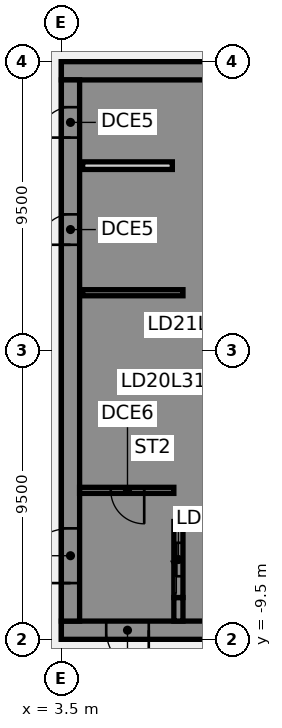
"""IFC4 building model, lengths in metres.
Left out: names, types, materials, properties, quantities, classifications, styles, units other than length and angle.
Written with IfcOpenShell. Run it as: python <this file> out.ifc"""

import sys

from ifc_helpers import new_model, si_unit, direction, frame, frame_2d, origin, place, context, subcontext, project, spatial, polyline, rectangle, outline, extrude, element, fill, save


model = new_model("IFC4")
c1 = context("Model", 3, precision=1e-05, world=origin(), true_north=direction((0.0, 1.0)))
c2 = subcontext(c1, "Body", "Model", "MODEL_VIEW")
j1 = project(units=[si_unit("LENGTHUNIT", "METRE"), si_unit("PLANEANGLEUNIT", "RADIAN")], contexts=[c1])
p1 = place(None, origin())
s1 = spatial("IfcSite", under=j1, at=p1, CompositionType="ELEMENT")
p2 = place(p1, origin())
s2 = spatial("IfcBuilding", under=s1, at=p2, CompositionType="ELEMENT")
p3 = place(p2, frame((0.0, 0.0, 128.5)))
s3 = spatial("IfcBuildingStorey", under=s2, at=p3, CompositionType="ELEMENT", Elevation=128.5)
p4 = place(p3, frame((16.5, -9.2, 0.0), z_axis=(0.0, 0.0, 1.0), x_axis=(-1.0, 0.0, 0.0)))
e1 = element("IfcWall", 1, at=p4, inside=s3, PredefinedType="SHEAR", context=c2, shape_type="SweptSolid", body=[
    extrude(rectangle(XDim=13.0, YDim=0.6, at=frame_2d((6.5, 0.0))), origin(), (0.0, 0.0, 1.0), 4.36),
])
p5 = place(p4, frame((4.15, 0.0, 0.0)))
e2 = element("IfcOpeningElement", 2, at=p5, cuts=e1, PredefinedType="OPENING", context=c2, shape_type="SweptSolid", body=[
    extrude(rectangle(XDim=1.4, YDim=2.1, at=frame_2d((0.7, 1.05))), frame((0.0, 0.31, 0.0), z_axis=(0.0, -1.0, 0.0), x_axis=(1.0, 0.0, 0.0)), (0.0, 0.0, 1.0), 0.62),
])
p6 = place(p4, frame((10.125, 0.0, 0.0)))
e3 = element("IfcOpeningElement", 3, at=p6, cuts=e1, PredefinedType="OPENING", context=c2, shape_type="SweptSolid", body=[
    extrude(rectangle(XDim=1.4, YDim=2.1, at=frame_2d((0.7, 1.05))), frame((0.0, 0.31, 0.0), z_axis=(0.0, -1.0, 0.0), x_axis=(1.0, 0.0, 0.0)), (0.0, 0.0, 1.0), 0.62),
])
p7 = place(p3, frame((16.5, 9.2, 0.0), z_axis=(0.0, 0.0, 1.0), x_axis=(-1.0, 0.0, 0.0)))
e4 = element("IfcWall", 4, at=p7, inside=s3, PredefinedType="SHEAR", context=c2, shape_type="SweptSolid", body=[
    extrude(rectangle(XDim=13.0, YDim=0.6, at=frame_2d((6.5, 0.0))), origin(), (0.0, 0.0, 1.0), 4.36),
])
p8 = place(p7, frame((4.15, 0.0, 0.0)))
e5 = element("IfcOpeningElement", 5, at=p8, cuts=e4, PredefinedType="OPENING", context=c2, shape_type="SweptSolid", body=[
    extrude(rectangle(XDim=1.4, YDim=2.1, at=frame_2d((0.7, 1.05))), frame((0.0, 0.31, 0.0), z_axis=(0.0, -1.0, 0.0), x_axis=(1.0, 0.0, 0.0)), (0.0, 0.0, 1.0), 0.62),
])
p9 = place(p3, origin())
e6 = element("IfcWall", 6, at=p9, inside=s3, PredefinedType="SHEAR", context=c2, shape_type="SweptSolid", body=[
    extrude(outline(polyline([(9.8, -5.375), (7.5, -5.375), (7.5, -2.875), (9.8, -2.875), (9.8, -2.625), (7.5, -2.625), (7.5, -0.125), (9.8, -0.125), (9.8, 0.125), (7.5, 0.125), (7.5, 2.625), (9.8, 2.625), (9.8, 2.875), (7.5, 2.875), (7.5, 5.375), (9.8, 5.375), (9.8, 5.625), (7.5, 5.625), (7.5, 8.125), (9.8, 8.125), (9.8, 8.9), (7.5, 8.9), (7.2, 8.9), (7.2, -5.625), (7.5, -5.625), (9.8, -5.625), (9.8, -5.375)])), origin(), (0.0, 0.0, 1.0), 4.36),
])
p10 = place(p3, origin())
e7 = element("IfcWall", 7, at=p10, inside=s3, PredefinedType="SHEAR", context=c2, shape_type="SweptSolid", body=[
    extrude(outline(polyline([(7.5, -8.125), (7.5, -8.9), (9.8, -8.9), (9.8, -8.125), (9.8, -5.625), (9.55, -5.625), (9.55, -8.125), (7.5, -8.125)])), origin(), (0.0, 0.0, 1.0), 4.36),
])
p11 = place(p3, frame((7.35, -8.9, 0.0), z_axis=(0.0, 0.0, 1.0), x_axis=(0.0, 1.0, 0.0)))
e8 = element("IfcWall", 8, at=p11, inside=s3, PredefinedType="SHEAR", context=c2, shape_type="SweptSolid", body=[
    extrude(rectangle(XDim=0.775, YDim=0.3, at=frame_2d((0.387, 0.0))), origin(), (0.0, 0.0, 1.0), 4.36),
])
p12 = place(p3, frame((7.5, 1.9, 0.0), z_axis=(0.0, 0.0, 1.0), x_axis=(-1.0, 0.0, 0.0)))
e9 = element("IfcWall", 9, at=p12, inside=s3, PredefinedType="SHEAR", context=c2, shape_type="SweptSolid", body=[
    extrude(rectangle(XDim=3.3, YDim=0.2, at=frame_2d((1.65, 0.0))), origin(), (0.0, 0.0, 1.0), 4.36),
])
p13 = place(p3, frame((7.35, -8.125, 0.0), z_axis=(0.0, 0.0, 1.0), x_axis=(0.0, 1.0, 0.0)))
e10 = element("IfcWall", 10, at=p13, inside=s3, PredefinedType="SHEAR", context=c2, shape_type="SweptSolid", body=[
    extrude(rectangle(XDim=2.5, YDim=0.3, at=frame_2d((1.25, 0.0))), origin(), (0.0, 0.0, 1.0), 4.36),
])
p14 = place(p13, frame((0.7, 0.0, 0.0)))
e11 = element("IfcOpeningElement", 11, at=p14, cuts=e10, PredefinedType="OPENING", context=c2, shape_type="SweptSolid", body=[
    extrude(rectangle(XDim=1.1, YDim=2.1, at=frame_2d((0.55, 1.05))), frame((0.0, 0.16, 0.0), z_axis=(0.0, -1.0, 0.0), x_axis=(1.0, 0.0, 0.0)), (0.0, 0.0, 1.0), 0.32),
])
p15 = place(p3, frame((3.8, -8.9, 0.0), z_axis=(0.0, 0.0, 1.0), x_axis=(0.0, 1.0, 0.0)))
e12 = element("IfcWall", 12, at=p15, inside=s3, PredefinedType="SHEAR", context=c2, shape_type="SweptSolid", body=[
    extrude(rectangle(XDim=17.8, YDim=0.6, at=frame_2d((8.9, 0.0))), origin(), (0.0, 0.0, 1.0), 4.36),
])
p16 = place(p15, frame((1.25, 0.0, 0.0)))
e13 = element("IfcOpeningElement", 13, at=p16, cuts=e12, PredefinedType="OPENING", context=c2, shape_type="SweptSolid", body=[
    extrude(rectangle(XDim=1.8, YDim=2.1, at=frame_2d((0.9, 1.05))), frame((0.0, 0.31, 0.0), z_axis=(0.0, -1.0, 0.0), x_axis=(1.0, 0.0, 0.0)), (0.0, 0.0, 1.0), 0.62),
])
p17 = place(p15, frame((12.377, 0.0, 0.0)))
e14 = element("IfcOpeningElement", 14, at=p17, cuts=e12, PredefinedType="OPENING", context=c2, shape_type="SweptSolid", body=[
    extrude(rectangle(XDim=1.0, YDim=2.1, at=frame_2d((0.5, 1.05))), frame((0.0, 0.31, 0.0), z_axis=(0.0, -1.0, 0.0), x_axis=(1.0, 0.0, 0.0)), (0.0, 0.0, 1.0), 0.62),
])
p18 = place(p15, frame((15.903, 0.0, 0.0)))
e15 = element("IfcOpeningElement", 15, at=p18, cuts=e12, PredefinedType="OPENING", context=c2, shape_type="SweptSolid", body=[
    extrude(rectangle(XDim=1.0, YDim=2.1, at=frame_2d((0.5, 1.05))), frame((0.0, 0.31, 0.0), z_axis=(0.0, -1.0, 0.0), x_axis=(1.0, 0.0, 0.0)), (0.0, 0.0, 1.0), 0.62),
])
p19 = place(p3, frame((7.15, 6.08, 0.0), z_axis=(0.0, 0.0, 1.0), x_axis=(-1.0, 0.0, 0.0)))
e16 = element("IfcWall", 16, at=p19, inside=s3, PredefinedType="PARTITIONING", context=c2, shape_type="SweptSolid", body=[
    extrude(rectangle(XDim=2.95, YDim=0.25, at=frame_2d((1.475, 0.0))), origin(), (0.0, 0.0, 1.0), 4.36),
])
p20 = place(p3, frame((7.2, -4.6, 0.0), z_axis=(0.0, 0.0, 1.0), x_axis=(-1.0, 0.0, 0.0)))
e17 = element("IfcWall", 17, at=p20, inside=s3, PredefinedType="SHEAR", context=c2, shape_type="SweptSolid", body=[
    extrude(rectangle(XDim=3.1, YDim=0.2, at=frame_2d((1.55, 0.0))), origin(), (0.0, 0.0, 1.0), 4.36),
])
p21 = place(p20, frame((0.975, 0.0, 0.0)))
e18 = element("IfcOpeningElement", 18, at=p21, cuts=e17, PredefinedType="OPENING", context=c2, shape_type="SweptSolid", body=[
    extrude(rectangle(XDim=1.1, YDim=2.1, at=frame_2d((0.55, 1.05))), frame((0.0, 0.11, 0.0), z_axis=(0.0, -1.0, 0.0), x_axis=(1.0, 0.0, 0.0)), (0.0, 0.0, 1.0), 0.22),
])
p22 = place(p6, origin())
e19 = element("IfcDoor", 19, at=p22, inside=s3, OperationType="SINGLE_SWING_LEFT", PredefinedType="DOOR", context=c2, shape_type="SweptSolid", body=[
    extrude(rectangle(XDim=1.4, YDim=2.1, at=frame_2d((0.7, 1.05))), frame((0.0, 0.025, 0.0), z_axis=(0.0, -1.0, 0.0), x_axis=(1.0, 0.0, 0.0)), (0.0, 0.0, 1.0), 0.05),
])
fill(e3, e19)
p23 = place(p16, origin())
e20 = element("IfcDoor", 20, at=p23, inside=s3, OperationType="SINGLE_SWING_LEFT", PredefinedType="DOOR", context=c2, shape_type="SweptSolid", body=[
    extrude(rectangle(XDim=1.8, YDim=2.1, at=frame_2d((0.9, 1.05))), frame((0.0, 0.025, 0.0), z_axis=(0.0, -1.0, 0.0), x_axis=(1.0, 0.0, 0.0)), (0.0, 0.0, 1.0), 0.05),
])
fill(e13, e20)
p24 = place(p17, origin())
e21 = element("IfcDoor", 21, at=p24, inside=s3, OperationType="SINGLE_SWING_LEFT", PredefinedType="DOOR", context=c2, shape_type="SweptSolid", body=[
    extrude(rectangle(XDim=1.0, YDim=2.1, at=frame_2d((0.5, 1.05))), frame((0.0, -0.225, 0.0), z_axis=(0.0, -1.0, 0.0), x_axis=(1.0, 0.0, 0.0)), (0.0, 0.0, 1.0), 0.05),
])
fill(e14, e21)
p25 = place(p18, origin())
e22 = element("IfcDoor", 22, at=p25, inside=s3, OperationType="SINGLE_SWING_LEFT", PredefinedType="DOOR", context=c2, shape_type="SweptSolid", body=[
    extrude(rectangle(XDim=1.0, YDim=2.1, at=frame_2d((0.5, 1.05))), frame((0.0, -0.225, 0.0), z_axis=(0.0, -1.0, 0.0), x_axis=(1.0, 0.0, 0.0)), (0.0, 0.0, 1.0), 0.05),
])
fill(e15, e22)
p26 = place(p21, origin())
e23 = element("IfcDoor", 23, at=p26, inside=s3, OperationType="SINGLE_SWING_LEFT", PredefinedType="DOOR", context=c2, shape_type="SweptSolid", body=[
    extrude(rectangle(XDim=1.1, YDim=2.1, at=frame_2d((0.55, 1.05))), frame((0.0, 0.025, 0.0), z_axis=(0.0, -1.0, 0.0), x_axis=(1.0, 0.0, 0.0)), (0.0, 0.0, 1.0), 0.05),
])
fill(e18, e23)
p27 = place(p14, origin())
e24 = element("IfcDoor", 24, at=p27, inside=s3, OperationType="SLIDING_TO_LEFT", PredefinedType="DOOR", context=c2, shape_type="SweptSolid", body=[
    extrude(rectangle(XDim=1.1, YDim=2.1, at=frame_2d((0.55, 1.05))), frame((0.0, 0.025, 0.0), z_axis=(0.0, -1.0, 0.0), x_axis=(1.0, 0.0, 0.0)), (0.0, 0.0, 1.0), 0.05),
])
fill(e11, e24)
save(model, sys.argv[1])
